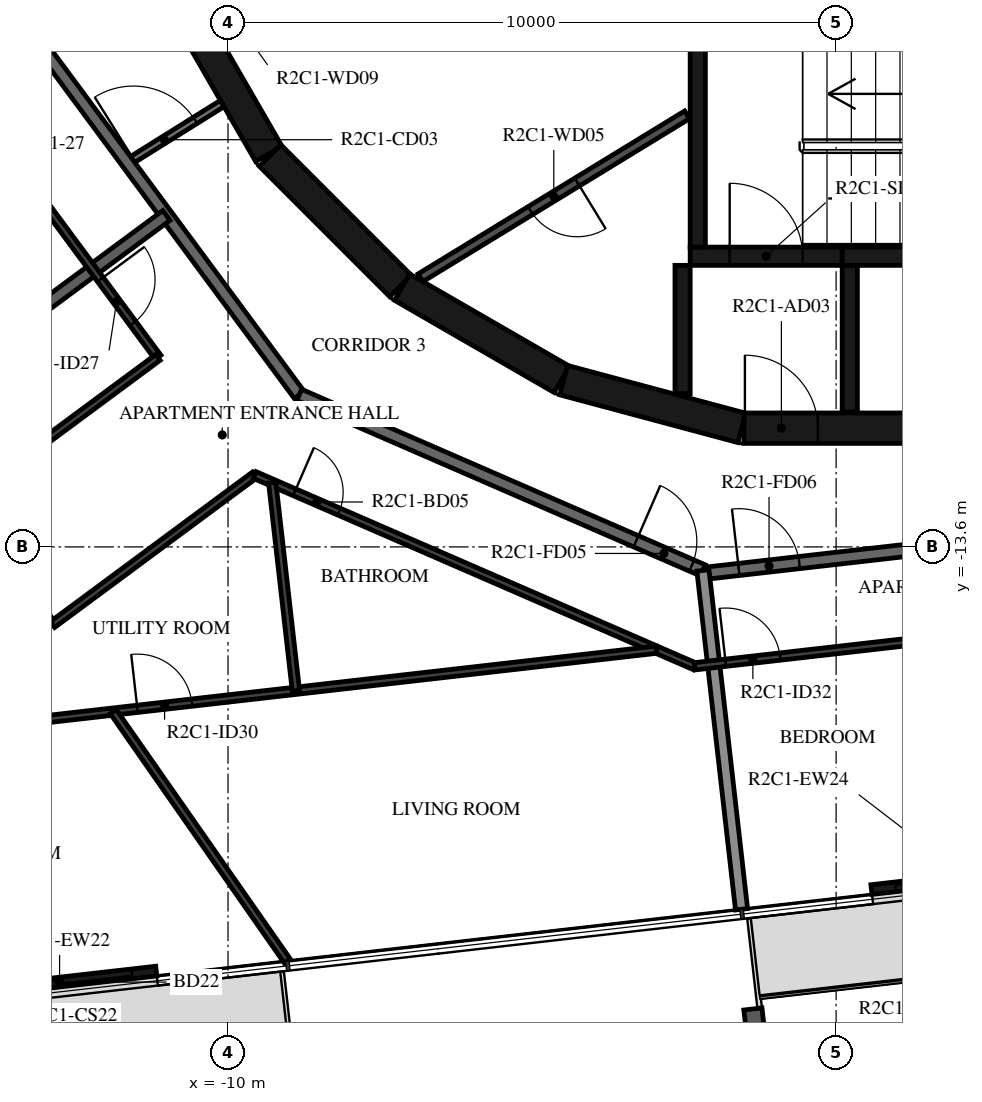
"""IFC4 building model, lengths in metres.
Left out: names, types, materials, properties, quantities, classifications, styles, units other than length and angle.
Written with IfcOpenShell. Run it as: python <this file> out.ifc"""

import sys

from ifc_helpers import new_model, si_unit, direction, frame, frame_2d, origin, origin_2d, place, context, subcontext, project, spatial, rectangle, i_section, extrude, element, fill, save


model = new_model("IFC4")
c1 = context("Model", 3, precision=1e-05, world=origin(), true_north=direction((0.0, 1.0)))
c2 = subcontext(c1, "Body", "Model", "MODEL_VIEW")
j1 = project(units=[si_unit("LENGTHUNIT", "METRE"), si_unit("PLANEANGLEUNIT", "RADIAN")], contexts=[c1])
p1 = place(None, origin())
s1 = spatial("IfcSite", under=j1, at=p1, CompositionType="ELEMENT")
p2 = place(p1, origin())
s2 = spatial("IfcBuilding", under=s1, at=p2, CompositionType="ELEMENT")
p3 = place(p2, frame((0.0, 0.0, 101.2)))
s3 = spatial("IfcBuildingStorey", under=s2, at=p3, CompositionType="ELEMENT", Elevation=101.2)
p4 = place(p3, frame((-1.317, -21.646, -0.38), z_axis=(0.0, 0.0, 1.0), x_axis=(-0.993571881569, -0.113202986513, 0.0)))
e1 = element("IfcColumn", 1, at=p4, inside=s3, PredefinedType="COLUMN", context=c2, shape_type="SweptSolid", body=[
    extrude(i_section(OverallWidth=0.3, OverallDepth=0.9, WebThickness=0.019, FlangeThickness=0.035, FilletRadius=0.03, at=origin_2d()), origin(), (0.0, 0.0, 1.0), 3.5),
])
p5 = place(p3, frame((-14.36, -20.938, 0.0), z_axis=(0.0, 0.0, 1.0), x_axis=(0.993569019005, 0.11322810814, 0.0)))
e2 = element("IfcWall", 2, at=p5, inside=s3, PredefinedType="STANDARD", context=c2, shape_type="SweptSolid", body=[
    extrude(rectangle(XDim=3.2, YDim=0.16, at=frame_2d((1.6, 0.0))), origin(), (0.0, 0.0, 1.0), 3.12),
])
p6 = place(p5, frame((0.4, 0.0, 0.0)))
e3 = element("IfcOpeningElement", 3, at=p6, cuts=e2, PredefinedType="OPENING", context=c2, shape_type="SweptSolid", body=[
    extrude(rectangle(XDim=2.4, YDim=2.4, at=frame_2d((1.2, 1.2))), frame((0.0, 0.09, 0.0), z_axis=(0.0, -1.0, 0.0), x_axis=(1.0, 0.0, 0.0)), (0.0, 0.0, 1.0), 0.18),
])
p7 = place(p3, frame((0.581, -19.235, 0.0), z_axis=(0.0, 0.0, 1.0), x_axis=(0.993569997097, 0.113219525124, 0.0)))
e4 = element("IfcWall", 4, at=p7, inside=s3, PredefinedType="STANDARD", context=c2, shape_type="SweptSolid", body=[
    extrude(rectangle(XDim=3.2, YDim=0.16, at=frame_2d((1.6, 0.0))), origin(), (0.0, 0.0, 1.0), 3.12),
])
p8 = place(p7, frame((0.4, 0.0, 0.0)))
e5 = element("IfcOpeningElement", 5, at=p8, cuts=e4, PredefinedType="OPENING", context=c2, shape_type="SweptSolid", body=[
    extrude(rectangle(XDim=2.4, YDim=2.4, at=frame_2d((1.2, 1.2))), frame((0.0, 0.09, 0.0), z_axis=(0.0, -1.0, 0.0), x_axis=(1.0, 0.0, 0.0)), (0.0, 0.0, 1.0), 0.18),
])
p9 = place(p3, frame((-10.845, -4.51, 0.0), z_axis=(0.0, 0.0, 1.0), x_axis=(0.500087131594, -0.865975092491, 0.0)))
e6 = element("IfcWall", 6, at=p9, inside=s3, PredefinedType="SHEAR", context=c2, shape_type="SweptSolid", body=[
    extrude(rectangle(XDim=3.033, YDim=0.5, at=frame_2d((1.516, 0.0))), origin(), (0.0, 0.0, 1.0), 3.12),
])
p10 = place(p3, frame((-9.308, -7.164, 0.0), z_axis=(0.0, 0.0, 1.0), x_axis=(0.707106781187, -0.707106781187, 0.0)))
e7 = element("IfcWall", 7, at=p10, inside=s3, PredefinedType="SHEAR", context=c2, shape_type="SweptSolid", body=[
    extrude(rectangle(XDim=3.032, YDim=0.5, at=frame_2d((1.516, 0.0))), origin(), (0.0, 0.0, 1.0), 3.12),
])
for number, where, z_axis, x_axis in (
    (8, (-7.137, -9.329, 0.0), (0.0, 0.0, 1.0), (0.866, -0.5, 0.0)),
    (9, (-4.479, -10.858, 0.0), (0.0, 0.0, 1.0), (0.966, -0.259, 0.0)),
):
    element("IfcWall", number, at=place(p3, frame(where, z_axis=z_axis, x_axis=x_axis)), inside=s3, PredefinedType="SHEAR", context=c2, shape_type="SweptSolid", body=[
        extrude(rectangle(XDim=3.033, YDim=0.5, at=frame_2d((1.516, 0.0))), origin(), (0.0, 0.0, 1.0), 3.12),
    ])
p11 = place(p3, frame((-1.516, -11.647, 0.0), z_axis=(0.0, 0.0, 1.0), x_axis=(1.0, 0.0, 0.0)))
e10 = element("IfcWall", 10, at=p11, inside=s3, PredefinedType="SHEAR", context=c2, shape_type="SweptSolid", body=[
    extrude(rectangle(XDim=3.033, YDim=0.5, at=frame_2d((1.516, 0.0))), origin(), (0.0, 0.0, 1.0), 3.12),
])
p12 = place(p11, frame((0.016, 0.0, 0.0)))
e11 = element("IfcOpeningElement", 11, at=p12, cuts=e10, PredefinedType="OPENING", context=c2, shape_type="SweptSolid", body=[
    extrude(rectangle(XDim=1.2, YDim=2.1, at=frame_2d((0.6, 1.05))), frame((0.0, 0.26, 0.0), z_axis=(0.0, -1.0, 0.0), x_axis=(1.0, 0.0, 0.0)), (0.0, 0.0, 1.0), 0.52),
])
p13 = place(p3, frame((-2.275, -8.67, 0.0), z_axis=(0.0, 0.0, 1.0), x_axis=(0.0, 1.0, 0.0)))
e12 = element("IfcWall", 12, at=p13, inside=s3, PredefinedType="SHEAR", context=c2, shape_type="SweptSolid", body=[
    extrude(rectangle(XDim=3.32, YDim=0.25, at=frame_2d((1.66, 0.0))), origin(), (0.0, 0.0, 1.0), 3.12),
])
p14 = place(p3, frame((0.1, -8.82, 0.0), z_axis=(0.0, 0.0, 1.0), x_axis=(1.0, 0.0, 0.0)))
e13 = element("IfcWall", 13, at=p14, inside=s3, PredefinedType="SHEAR", context=c2, shape_type="SweptSolid", body=[
    extrude(rectangle(XDim=4.55, YDim=0.3, at=frame_2d((2.275, 0.0))), origin(), (0.0, 0.0, 1.0), 3.12),
])
p15 = place(p3, frame((-2.4, -8.82, 0.0), z_axis=(0.0, 0.0, 1.0), x_axis=(1.0, 0.0, 0.0)))
e14 = element("IfcWall", 14, at=p15, inside=s3, PredefinedType="SHEAR", context=c2, shape_type="SweptSolid", body=[
    extrude(rectangle(XDim=2.5, YDim=0.3, at=frame_2d((1.25, 0.0))), origin(), (0.0, 0.0, 1.0), 3.12),
])
p16 = place(p15, frame((0.65, 0.0, 0.0)))
e15 = element("IfcOpeningElement", 15, at=p16, cuts=e14, PredefinedType="OPENING", context=c2, shape_type="SweptSolid", body=[
    extrude(rectangle(XDim=1.2, YDim=2.1, at=frame_2d((0.6, 1.05))), frame((0.0, 0.16, 0.0), z_axis=(0.0, -1.0, 0.0), x_axis=(1.0, 0.0, 0.0)), (0.0, 0.0, 1.0), 0.32),
])
p17 = place(p3, frame((-2.525, -8.97, 0.0), z_axis=(0.0, 0.0, 1.0), x_axis=(0.0, -1.0, 0.0)))
e16 = element("IfcWall", 16, at=p17, inside=s3, PredefinedType="SHEAR", context=c2, shape_type="SweptSolid", body=[
    extrude(rectangle(XDim=2.11, YDim=0.25, at=frame_2d((1.055, 0.0))), origin(), (0.0, 0.0, 1.0), 3.12),
])
p18 = place(p3, frame((0.225, -8.97, 0.0), z_axis=(0.0, 0.0, 1.0), x_axis=(0.0, -1.0, 0.0)))
e17 = element("IfcWall", 17, at=p18, inside=s3, PredefinedType="SHEAR", context=c2, shape_type="SweptSolid", body=[
    extrude(rectangle(XDim=2.41, YDim=0.25, at=frame_2d((1.205, 0.0))), origin(), (0.0, 0.0, 1.0), 3.12),
])
p19 = place(p3, frame((-2.451, -6.495, 0.0), z_axis=(0.0, 0.0, 1.0), x_axis=(-0.853250115418, -0.521501908471, 0.0)))
e18 = element("IfcWall", 18, at=p19, inside=s3, PredefinedType="PARTITIONING", context=c2, shape_type="SweptSolid", body=[
    extrude(rectangle(XDim=5.137, YDim=0.15, at=frame_2d((2.569, 0.0))), origin(), (0.0, 0.0, 1.0), 3.12),
])
p20 = place(p19, frame((2.119, 0.0, 0.0)))
e19 = element("IfcOpeningElement", 19, at=p20, cuts=e18, PredefinedType="OPENING", context=c2, shape_type="SweptSolid", body=[
    extrude(rectangle(XDim=0.9, YDim=2.1, at=frame_2d((0.45, 1.05))), frame((0.0, 0.085, 0.0), z_axis=(0.0, -1.0, 0.0), x_axis=(1.0, 0.0, 0.0)), (0.0, 0.0, 1.0), 0.17),
])
p21 = place(p3, frame((-11.654, -7.282, 0.0), z_axis=(0.0, 0.0, 1.0), x_axis=(0.848117698675, 0.529807860638, 0.0)))
e20 = element("IfcWall", 20, at=p21, inside=s3, PredefinedType="PARTITIONING", context=c2, shape_type="SweptSolid", body=[
    extrude(rectangle(XDim=1.838, YDim=0.12, at=frame_2d((0.919, 0.0))), origin(), (0.0, 0.0, 1.0), 3.12),
])
p22 = place(p21, frame((0.115, 0.0, 0.0)))
e21 = element("IfcOpeningElement", 21, at=p22, cuts=e20, PredefinedType="OPENING", context=c2, shape_type="SweptSolid", body=[
    extrude(rectangle(XDim=1.2, YDim=2.1, at=frame_2d((0.6, 1.05))), frame((0.0, 0.07, 0.0), z_axis=(0.0, -1.0, 0.0), x_axis=(1.0, 0.0, 0.0)), (0.0, 0.0, 1.0), 0.14),
])
p23 = place(p3, frame((-13.196, -5.198, 0.0), z_axis=(0.0, 0.0, 1.0), x_axis=(0.594805187394, -0.803869883159, 0.0)))
e22 = element("IfcWall", 22, at=p23, inside=s3, PredefinedType="STANDARD", context=c2, shape_type="SweptSolid", body=[
    extrude(rectangle(XDim=7.342, YDim=0.2, at=frame_2d((3.671, 0.0))), origin(), (0.0, 0.0, 1.0), 3.12),
])
p24 = place(p3, frame((-8.829, -11.1, 0.0), z_axis=(0.0, 0.0, 1.0), x_axis=(0.917063622491, -0.398740908742, 0.0)))
e23 = element("IfcWall", 23, at=p24, inside=s3, PredefinedType="STANDARD", context=c2, shape_type="SweptSolid", body=[
    extrude(rectangle(XDim=7.24, YDim=0.2, at=frame_2d((3.62, 0.0))), origin(), (0.0, 0.0, 1.0), 3.12),
])
p25 = place(p24, frame((6.04, 0.0, 0.0)))
e24 = element("IfcOpeningElement", 24, at=p25, cuts=e23, PredefinedType="OPENING", context=c2, shape_type="SweptSolid", body=[
    extrude(rectangle(XDim=1.0, YDim=2.1, at=frame_2d((0.5, 1.05))), frame((0.0, 0.11, 0.0), z_axis=(0.0, -1.0, 0.0), x_axis=(1.0, 0.0, 0.0)), (0.0, 0.0, 1.0), 0.22),
])
p26 = place(p3, frame((-2.096, -14.028, 0.0), z_axis=(0.0, 0.0, 1.0), x_axis=(0.993569170114, 0.113226782163, 0.0)))
e25 = element("IfcWall", 25, at=p26, inside=s3, PredefinedType="STANDARD", context=c2, shape_type="SweptSolid", body=[
    extrude(rectangle(XDim=7.342, YDim=0.2, at=frame_2d((3.671, 0.0))), origin(), (0.0, 0.0, 1.0), 3.12),
])
p27 = place(p26, frame((0.5, 0.0, 0.0)))
e26 = element("IfcOpeningElement", 26, at=p27, cuts=e25, PredefinedType="OPENING", context=c2, shape_type="SweptSolid", body=[
    extrude(rectangle(XDim=1.0, YDim=2.1, at=frame_2d((0.5, 1.05))), frame((0.0, 0.11, 0.0), z_axis=(0.0, -1.0, 0.0), x_axis=(1.0, 0.0, 0.0)), (0.0, 0.0, 1.0), 0.22),
])
p28 = place(p3, frame((-16.649, -12.32, 0.0), z_axis=(0.0, 0.0, 1.0), x_axis=(0.803869204071, 0.594806105169, 0.0)))
e27 = element("IfcWall", 27, at=p28, inside=s3, PredefinedType="STANDARD", context=c2, shape_type="SweptSolid", body=[
    extrude(rectangle(XDim=7.011, YDim=0.2, at=frame_2d((3.506, 0.0))), origin(), (0.0, 0.0, 1.0), 3.12),
])
p29 = place(p3, frame((-1.555, -19.559, 0.0), z_axis=(0.0, 0.0, 1.0), x_axis=(-0.113221250863, 0.993569800443, 0.0)))
e28 = element("IfcWall", 28, at=p29, inside=s3, PredefinedType="STANDARD", context=c2, shape_type="SweptSolid", body=[
    extrude(rectangle(XDim=5.609, YDim=0.2, at=frame_2d((2.804, 0.0))), origin(), (0.0, 0.0, 1.0), 2.73),
])
p30 = place(p3, frame((-13.164, -7.764, 0.0), z_axis=(0.0, 0.0, 1.0), x_axis=(0.594837409261, -0.803846040324, 0.0)))
e29 = element("IfcWall", 29, at=p30, inside=s3, PredefinedType="PARTITIONING", context=c2, shape_type="SweptSolid", body=[
    extrude(rectangle(XDim=3.383, YDim=0.12, at=frame_2d((1.691, 0.0))), origin(), (0.0, 0.0, 1.0), 3.12),
])
p31 = place(p30, frame((1.789, 0.0, 0.0)))
e30 = element("IfcOpeningElement", 30, at=p31, cuts=e29, PredefinedType="OPENING", context=c2, shape_type="SweptSolid", body=[
    extrude(rectangle(XDim=0.9, YDim=2.1, at=frame_2d((0.45, 1.05))), frame((0.0, 0.07, 0.0), z_axis=(0.0, -1.0, 0.0), x_axis=(1.0, 0.0, 0.0)), (0.0, 0.0, 1.0), 0.14),
])
p32 = place(p3, frame((-11.152, -10.483, 0.0), z_axis=(0.0, 0.0, 1.0), x_axis=(-0.803843064298, -0.594841430954, 0.0)))
e31 = element("IfcWall", 31, at=p32, inside=s3, PredefinedType="PARTITIONING", context=c2, shape_type="SweptSolid", body=[
    extrude(rectangle(XDim=4.008, YDim=0.12, at=frame_2d((2.004, 0.0))), origin(), (0.0, 0.0, 1.0), 3.12),
])
p33 = place(p3, frame((-14.374, -12.867, 0.0), z_axis=(0.0, 0.0, 1.0), x_axis=(0.594800097121, -0.803873649565, 0.0)))
e32 = element("IfcWall", 32, at=p33, inside=s3, PredefinedType="PARTITIONING", context=c2, shape_type="SweptSolid", body=[
    extrude(rectangle(XDim=2.5, YDim=0.12, at=frame_2d((1.25, 0.0))), origin(), (0.0, 0.0, 1.0), 3.12),
])
p34 = place(p3, frame((-12.886, -14.877, 0.0), z_axis=(0.0, 0.0, 1.0), x_axis=(0.803816491389, 0.594877338761, 0.0)))
e33 = element("IfcWall", 33, at=p34, inside=s3, PredefinedType="PARTITIONING", context=c2, shape_type="SweptSolid", body=[
    extrude(rectangle(XDim=4.135, YDim=0.12, at=frame_2d((2.068, 0.0))), origin(), (0.0, 0.0, 1.0), 3.12),
])
p35 = place(p3, frame((-9.562, -12.417, 0.0), z_axis=(0.0, 0.0, 1.0), x_axis=(0.917063169851, -0.398741949767, 0.0)))
e34 = element("IfcWall", 34, at=p35, inside=s3, PredefinedType="PARTITIONING", context=c2, shape_type="SweptSolid", body=[
    extrude(rectangle(XDim=7.891, YDim=0.12, at=frame_2d((3.946, 0.0))), origin(), (0.0, 0.0, 1.0), 3.12),
])
p36 = place(p35, frame((0.715, 0.0, 0.0)))
e35 = element("IfcOpeningElement", 35, at=p36, cuts=e34, PredefinedType="OPENING", context=c2, shape_type="SweptSolid", body=[
    extrude(rectangle(XDim=0.8, YDim=2.1, at=frame_2d((0.4, 1.05))), frame((0.0, 0.07, 0.0), z_axis=(0.0, -1.0, 0.0), x_axis=(1.0, 0.0, 0.0)), (0.0, 0.0, 1.0), 0.14),
])
p37 = place(p3, frame((-2.326, -15.563, 0.0), z_axis=(0.0, 0.0, 1.0), x_axis=(0.993575068384, 0.113175012641, 0.0)))
e36 = element("IfcWall", 36, at=p37, inside=s3, PredefinedType="PARTITIONING", context=c2, shape_type="SweptSolid", body=[
    extrude(rectangle(XDim=3.799, YDim=0.12, at=frame_2d((1.899, 0.0))), origin(), (0.0, 0.0, 1.0), 3.12),
])
p38 = place(p37, frame((0.513, 0.0, 0.0)))
e37 = element("IfcOpeningElement", 37, at=p38, cuts=e36, PredefinedType="OPENING", context=c2, shape_type="SweptSolid", body=[
    extrude(rectangle(XDim=0.9, YDim=2.1, at=frame_2d((0.45, 1.05))), frame((0.0, 0.07, 0.0), z_axis=(0.0, -1.0, 0.0), x_axis=(1.0, 0.0, 0.0)), (0.0, 0.0, 1.0), 0.14),
])
p39 = place(p3, frame((-17.437, -16.94, 0.0), z_axis=(0.0, 0.0, 1.0), x_axis=(0.993573314119, 0.113190412448, 0.0)))
e38 = element("IfcWall", 38, at=p39, inside=s3, PredefinedType="PARTITIONING", context=c2, shape_type="SweptSolid", body=[
    extrude(rectangle(XDim=14.576, YDim=0.12, at=frame_2d((7.288, 0.0))), origin(), (0.0, 0.0, 1.0), 3.12),
])
p40 = place(p39, frame((3.201, 0.0, 0.0)))
e39 = element("IfcOpeningElement", 39, at=p40, cuts=e38, PredefinedType="OPENING", context=c2, shape_type="SweptSolid", body=[
    extrude(rectangle(XDim=0.9, YDim=2.1, at=frame_2d((0.45, 1.05))), frame((0.0, 0.07, 0.0), z_axis=(0.0, -1.0, 0.0), x_axis=(1.0, 0.0, 0.0)), (0.0, 0.0, 1.0), 0.14),
])
p41 = place(p39, frame((5.985, 0.0, 0.0)))
e40 = element("IfcOpeningElement", 40, at=p41, cuts=e38, PredefinedType="OPENING", context=c2, shape_type="SweptSolid", body=[
    extrude(rectangle(XDim=0.9, YDim=2.1, at=frame_2d((0.45, 1.05))), frame((0.0, 0.07, 0.0), z_axis=(0.0, -1.0, 0.0), x_axis=(1.0, 0.0, 0.0)), (0.0, 0.0, 1.0), 0.14),
])
p42 = place(p3, frame((-8.884, -15.966, 0.0), z_axis=(0.0, 0.0, 1.0), x_axis=(-0.113230836929, 0.993568708026, 0.0)))
e41 = element("IfcWall", 41, at=p42, inside=s3, PredefinedType="PARTITIONING", context=c2, shape_type="SweptSolid", body=[
    extrude(rectangle(XDim=3.446, YDim=0.12, at=frame_2d((1.723, 0.0))), origin(), (0.0, 0.0, 1.0), 3.12),
])
p43 = place(p3, frame((-9.026, -20.41, 0.0), z_axis=(0.0, 0.0, 1.0), x_axis=(-0.57218083256, 0.82012748695, 0.0)))
e42 = element("IfcWall", 42, at=p43, inside=s3, PredefinedType="PARTITIONING", context=c2, shape_type="SweptSolid", body=[
    extrude(rectangle(XDim=5.002, YDim=0.12, at=frame_2d((2.501, 0.0))), origin(), (0.0, 0.0, 1.0), 3.12),
])
p44 = place(p6, origin())
e43 = element("IfcDoor", 43, at=p44, inside=s3, OperationType="DOUBLE_DOOR_SLIDING", PredefinedType="DOOR", context=c2, shape_type="SweptSolid", body=[
    extrude(rectangle(XDim=2.4, YDim=2.4, at=frame_2d((1.2, 1.2))), frame((0.0, 0.025, 0.0), z_axis=(0.0, -1.0, 0.0), x_axis=(1.0, 0.0, 0.0)), (0.0, 0.0, 1.0), 0.05),
])
fill(e3, e43)
p45 = place(p8, origin())
e44 = element("IfcDoor", 44, at=p45, inside=s3, OperationType="DOUBLE_DOOR_SLIDING", PredefinedType="DOOR", context=c2, shape_type="SweptSolid", body=[
    extrude(rectangle(XDim=2.4, YDim=2.4, at=frame_2d((1.2, 1.2))), frame((0.0, 0.025, 0.0), z_axis=(0.0, -1.0, 0.0), x_axis=(1.0, 0.0, 0.0)), (0.0, 0.0, 1.0), 0.05),
])
fill(e5, e44)
p46 = place(p16, origin())
e45 = element("IfcDoor", 45, at=p46, inside=s3, OperationType="SINGLE_SWING_LEFT", PredefinedType="DOOR", context=c2, shape_type="SweptSolid", body=[
    extrude(rectangle(XDim=1.2, YDim=2.1, at=frame_2d((0.6, 1.05))), frame((0.0, 0.025, 0.0), z_axis=(0.0, -1.0, 0.0), x_axis=(1.0, 0.0, 0.0)), (0.0, 0.0, 1.0), 0.05),
])
fill(e15, e45)
p47 = place(p12, origin())
e46 = element("IfcDoor", 46, at=p47, inside=s3, OperationType="SINGLE_SWING_RIGHT", PredefinedType="DOOR", context=c2, shape_type="SweptSolid", body=[
    extrude(rectangle(XDim=1.2, YDim=2.1, at=frame_2d((0.6, 1.05))), frame((0.0, 0.025, 0.0), z_axis=(0.0, -1.0, 0.0), x_axis=(1.0, 0.0, 0.0)), (0.0, 0.0, 1.0), 0.05),
])
fill(e11, e46)
p48 = place(p20, origin())
e47 = element("IfcDoor", 47, at=p48, inside=s3, OperationType="SINGLE_SWING_RIGHT", PredefinedType="DOOR", context=c2, shape_type="SweptSolid", body=[
    extrude(rectangle(XDim=0.9, YDim=2.1, at=frame_2d((0.45, 1.05))), frame((0.0, 0.025, 0.0), z_axis=(0.0, -1.0, 0.0), x_axis=(1.0, 0.0, 0.0)), (0.0, 0.0, 1.0), 0.05),
])
fill(e19, e47)
p49 = place(p25, origin())
e48 = element("IfcDoor", 48, at=p49, inside=s3, OperationType="SINGLE_SWING_LEFT", PredefinedType="DOOR", context=c2, shape_type="SweptSolid", body=[
    extrude(rectangle(XDim=1.0, YDim=2.1, at=frame_2d((0.5, 1.05))), frame((0.0, 0.025, 0.0), z_axis=(0.0, -1.0, 0.0), x_axis=(1.0, 0.0, 0.0)), (0.0, 0.0, 1.0), 0.05),
])
fill(e24, e48)
p50 = place(p31, origin())
e49 = element("IfcDoor", 49, at=p50, inside=s3, OperationType="SINGLE_SWING_LEFT", PredefinedType="DOOR", context=c2, shape_type="SweptSolid", body=[
    extrude(rectangle(XDim=0.9, YDim=2.1, at=frame_2d((0.45, 1.05))), frame((0.0, 0.025, 0.0), z_axis=(0.0, -1.0, 0.0), x_axis=(1.0, 0.0, 0.0)), (0.0, 0.0, 1.0), 0.05),
])
fill(e30, e49)
p51 = place(p36, origin())
e50 = element("IfcDoor", 50, at=p51, inside=s3, OperationType="SINGLE_SWING_LEFT", PredefinedType="DOOR", context=c2, shape_type="SweptSolid", body=[
    extrude(rectangle(XDim=0.8, YDim=2.1, at=frame_2d((0.4, 1.05))), frame((0.0, 0.025, 0.0), z_axis=(0.0, -1.0, 0.0), x_axis=(1.0, 0.0, 0.0)), (0.0, 0.0, 1.0), 0.05),
])
fill(e35, e50)
p52 = place(p41, origin())
e51 = element("IfcDoor", 51, at=p52, inside=s3, OperationType="SINGLE_SWING_LEFT", PredefinedType="DOOR", context=c2, shape_type="SweptSolid", body=[
    extrude(rectangle(XDim=0.9, YDim=2.1, at=frame_2d((0.45, 1.05))), frame((0.0, 0.025, 0.0), z_axis=(0.0, -1.0, 0.0), x_axis=(1.0, 0.0, 0.0)), (0.0, 0.0, 1.0), 0.05),
])
fill(e40, e51)
p53 = place(p27, origin())
e52 = element("IfcDoor", 52, at=p53, inside=s3, OperationType="SINGLE_SWING_LEFT", PredefinedType="DOOR", context=c2, shape_type="SweptSolid", body=[
    extrude(rectangle(XDim=1.0, YDim=2.1, at=frame_2d((0.5, 1.05))), frame((0.0, 0.025, 0.0), z_axis=(0.0, -1.0, 0.0), x_axis=(1.0, 0.0, 0.0)), (0.0, 0.0, 1.0), 0.05),
])
fill(e26, e52)
p54 = place(p38, origin())
e53 = element("IfcDoor", 53, at=p54, inside=s3, OperationType="SINGLE_SWING_LEFT", PredefinedType="DOOR", context=c2, shape_type="SweptSolid", body=[
    extrude(rectangle(XDim=0.9, YDim=2.1, at=frame_2d((0.45, 1.05))), frame((0.0, 0.025, 0.0), z_axis=(0.0, -1.0, 0.0), x_axis=(1.0, 0.0, 0.0)), (0.0, 0.0, 1.0), 0.05),
])
fill(e37, e53)
p55 = place(p22, origin())
e54 = element("IfcDoor", 54, at=p55, inside=s3, OperationType="DOUBLE_DOOR_SINGLE_SWING", PredefinedType="DOOR", context=c2, shape_type="SweptSolid", body=[
    extrude(rectangle(XDim=1.2, YDim=2.1, at=frame_2d((0.6, 1.05))), frame((0.0, 0.025, 0.0), z_axis=(0.0, -1.0, 0.0), x_axis=(1.0, 0.0, 0.0)), (0.0, 0.0, 1.0), 0.05),
])
fill(e21, e54)
save(model, sys.argv[1])
